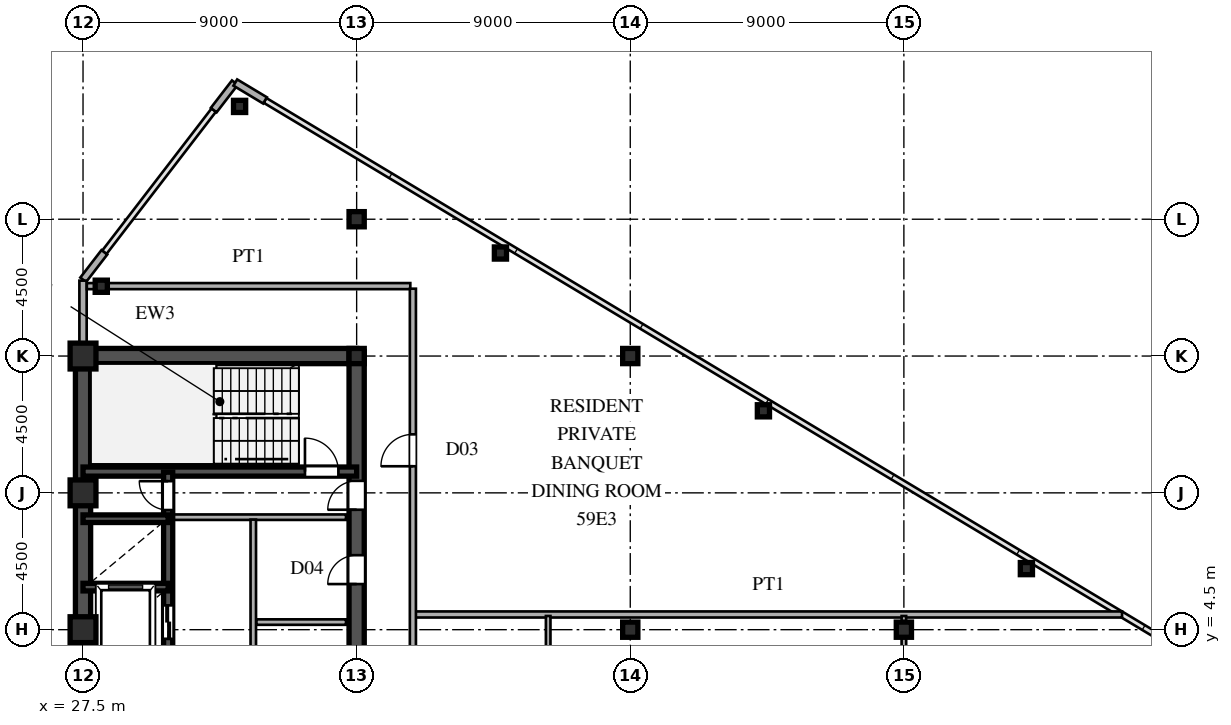
"""IFC4 building model, lengths in metres.
Left out: names, types, materials, properties, quantities, classifications, styles, units other than length and angle.
Written with IfcOpenShell. Run it as: python <this file> out.ifc"""

import sys

from ifc_helpers import new_model, si_unit, direction, frame, frame_2d, origin, origin_2d, place, context, subcontext, project, spatial, rectangle, hollow_rectangle, i_section, extrude, source, transform, mapped, element, fill, save


model = new_model("IFC4")
c1 = context("Model", 3, precision=1e-05, world=origin(), true_north=direction((0.0, 1.0)))
c2 = subcontext(c1, "Body", "Model", "MODEL_VIEW")
j1 = project(units=[si_unit("LENGTHUNIT", "METRE"), si_unit("PLANEANGLEUNIT", "RADIAN")], contexts=[c1])
p1 = place(None, origin())
s1 = spatial("IfcSite", under=j1, at=p1, CompositionType="ELEMENT")
p2 = place(p1, origin())
s2 = spatial("IfcBuilding", under=s1, at=p2, CompositionType="ELEMENT")
p3 = place(p2, frame((0.0, 0.0, 221.1)))
s3 = spatial("IfcBuildingStorey", under=s2, at=p3, CompositionType="ELEMENT", Elevation=221.1)
m1 = source(origin(), c2, "Body", "SweptSolid", [
    extrude(hollow_rectangle(XDim=0.85, YDim=0.85, WallThickness=0.036, at=origin_2d()), origin(), (0.0, 0.0, 1.0), 3.6),
])
for number, where, z_axis, x_axis in (
    (1, (27.5, 4.5, 0.0), (0.0, 0.0, 1.0), (1.0, 0.0, 0.0)),
    (2, (27.5, 9.0, 0.0), (0.0, 0.0, 1.0), (1.0, 0.0, 0.0)),
    (3, (27.5, 13.5, 0.0), (0.0, 0.0, 1.0), (1.0, 0.0, 0.0)),
):
    element("IfcColumn", number, at=place(p3, frame(where, z_axis=z_axis, x_axis=x_axis)), inside=s3, PredefinedType="COLUMN", context=c2, shape_type="MappedRepresentation", body=[
        mapped(m1, transform((0.0, 0.0, 0.0), scale=1.0)),
    ])
m2 = source(origin(), c2, "Body", "SweptSolid", [
    extrude(i_section(OverallWidth=0.5, OverallDepth=0.5, WebThickness=0.02, FlangeThickness=0.032, at=origin_2d()), origin(), (0.0, 0.0, 1.0), 3.6),
])
for number, where, z_axis, x_axis in (
    (4, (36.5, 13.5, 0.0), (0.0, 0.0, 1.0), (1.0, 0.0, 0.0)),
    (5, (36.5, 18.0, 0.0), (0.0, 0.0, 1.0), (1.0, 0.0, 0.0)),
    (6, (45.5, 4.5, 0.0), (0.0, 0.0, 1.0), (1.0, 0.0, 0.0)),
    (7, (45.5, 13.5, 0.0), (0.0, 0.0, 1.0), (1.0, 0.0, 0.0)),
    (8, (54.5, 4.5, 0.0), (0.0, 0.0, 1.0), (1.0, 0.0, 0.0)),
):
    element("IfcColumn", number, at=place(p3, frame(where, z_axis=z_axis, x_axis=x_axis)), inside=s3, PredefinedType="COLUMN", context=c2, shape_type="MappedRepresentation", body=[
        mapped(m2, transform((0.0, 0.0, 0.0), scale=1.0)),
    ])
m3 = source(origin(), c2, "Body", "SweptSolid", [
    extrude(hollow_rectangle(XDim=0.4, YDim=0.4, WallThickness=0.016, at=origin_2d()), origin(), (0.0, 0.0, 1.0), 3.6),
])
for number, where, z_axis, x_axis in (
    (9, (32.65, 21.71, 0.0), (0.0, 0.0, 1.0), (1.0, 0.0, 0.0)),
    (10, (28.1, 15.796, 0.0), (0.0, 0.0, 1.0), (1.0, 0.0, 0.0)),
    (11, (41.23, 16.889, 0.0), (0.0, 0.0, 1.0), (1.0, 0.0, 0.0)),
    (12, (49.88, 11.699, 0.0), (0.0, 0.0, 1.0), (1.0, 0.0, 0.0)),
    (13, (58.53, 6.509, 0.0), (0.0, 0.0, 1.0), (1.0, 0.0, 0.0)),
):
    element("IfcColumn", number, at=place(p3, frame(where, z_axis=z_axis, x_axis=x_axis)), inside=s3, PredefinedType="COLUMN", context=c2, shape_type="MappedRepresentation", body=[
        mapped(m3, transform((0.0, 0.0, 0.0), scale=1.0)),
    ])
for number, where, z_axis, x_axis in (
    (14, (33.486, 21.908, 0.0), (0.0, 0.0, 1.0), (-0.857, 0.515, 0.0)),
    (15, (32.494, 22.492, 0.0), (0.0, 0.0, 1.0), (-0.61, -0.793, 0.0)),
    (16, (28.201, 16.912, 0.0), (0.0, 0.0, 1.0), (-0.61, -0.793, 0.0)),
):
    element("IfcWall", number, at=place(p3, frame(where, z_axis=z_axis, x_axis=x_axis)), inside=s3, PredefinedType="SOLIDWALL", context=c2, shape_type="SweptSolid", body=[
        extrude(rectangle(XDim=1.14, YDim=0.24, at=frame_2d((0.57, 0.0))), origin(), (0.0, 0.0, 1.0), 3.34),
    ])
p4 = place(p3, frame((27.5, 13.755, 0.0), z_axis=(0.0, 0.0, 1.0), x_axis=(0.0, 1.0, 0.0)))
e17 = element("IfcWall", 17, at=p4, inside=s3, PredefinedType="SOLIDWALL", context=c2, shape_type="SweptSolid", body=[
    extrude(rectangle(XDim=0.62, YDim=0.24, at=frame_2d((0.31, 0.0))), origin(), (0.0, 0.0, 1.0), 2.84),
])
p5 = place(p3, frame((27.5, 14.375, 0.0), z_axis=(0.0, 0.0, 1.0), x_axis=(0.0, 1.0, 0.0)))
e18 = element("IfcWall", 18, at=p5, inside=s3, PredefinedType="SOLIDWALL", context=c2, shape_type="SweptSolid", body=[
    extrude(rectangle(XDim=1.605, YDim=0.24, at=frame_2d((0.803, 0.0))), origin(), (0.0, 0.0, 1.0), 3.34),
])
p6 = place(p3, frame((27.5, 1.3, 0.0), z_axis=(0.0, 0.0, 1.0), x_axis=(0.0, 1.0, 0.0)))
e19 = element("IfcWall", 19, at=p6, inside=s3, PredefinedType="SHEAR", context=c2, shape_type="SweptSolid", body=[
    extrude(rectangle(XDim=12.2, YDim=0.5, at=frame_2d((6.1, 0.0))), origin(), (0.0, 0.0, 1.0), 3.34),
])
p7 = place(p3, frame((27.5, 13.5, 0.0), z_axis=(0.0, 0.0, 1.0), x_axis=(1.0, 0.0, 0.0)))
e20 = element("IfcWall", 20, at=p7, inside=s3, PredefinedType="SHEAR", context=c2, shape_type="SweptSolid", body=[
    extrude(rectangle(XDim=9.0, YDim=0.5, at=frame_2d((4.5, 0.0))), origin(), (0.0, 0.0, 1.0), 3.34),
])
p8 = place(p3, frame((36.5, 8.2, 0.0), z_axis=(0.0, 0.0, 1.0), x_axis=(0.0, 1.0, 0.0)))
e21 = element("IfcWall", 21, at=p8, inside=s3, PredefinedType="SHEAR", context=c2, shape_type="SweptSolid", body=[
    extrude(rectangle(XDim=5.45, YDim=0.5, at=frame_2d((2.725, 0.0))), origin(), (0.0, 0.0, 1.0), 3.34),
])
p9 = place(p8, frame((0.245, 0.0, 0.0)))
e22 = element("IfcOpeningElement", 22, at=p9, cuts=e21, PredefinedType="OPENING", context=c2, shape_type="SweptSolid", body=[
    extrude(rectangle(XDim=0.95, YDim=2.15, at=frame_2d((0.475, 1.075))), frame((0.0, 0.26, 0.0), z_axis=(0.0, -1.0, 0.0), x_axis=(1.0, 0.0, 0.0)), (0.0, 0.0, 1.0), 0.52),
])
p10 = place(p3, frame((36.5, 1.3, 0.0), z_axis=(0.0, 0.0, 1.0), x_axis=(0.0, 1.0, 0.0)))
e23 = element("IfcWall", 23, at=p10, inside=s3, PredefinedType="SHEAR", context=c2, shape_type="SweptSolid", body=[
    extrude(rectangle(XDim=3.45, YDim=0.5, at=frame_2d((1.725, 0.0))), origin(), (0.0, 0.0, 1.0), 3.34),
])
p11 = place(p10, frame((1.25, 0.0, 0.0)))
e24 = element("IfcOpeningElement", 24, at=p11, cuts=e23, PredefinedType="OPENING", context=c2, shape_type="SweptSolid", body=[
    extrude(rectangle(XDim=0.95, YDim=2.15, at=frame_2d((0.475, 1.075))), frame((0.0, 0.26, 0.0), z_axis=(0.0, -1.0, 0.0), x_axis=(1.0, 0.0, 0.0)), (0.0, 0.0, 1.0), 0.52),
])
p12 = place(p3, frame((36.5, 4.75, 0.0), z_axis=(0.0, 0.0, 1.0), x_axis=(0.0, 1.0, 0.0)))
e25 = element("IfcWall", 25, at=p12, inside=s3, PredefinedType="SHEAR", context=c2, shape_type="SweptSolid", body=[
    extrude(rectangle(XDim=3.45, YDim=0.5, at=frame_2d((1.725, 0.0))), origin(), (0.0, 0.0, 1.0), 3.34),
])
p13 = place(p12, frame((1.25, 0.0, 0.0)))
e26 = element("IfcOpeningElement", 26, at=p13, cuts=e25, PredefinedType="OPENING", context=c2, shape_type="SweptSolid", body=[
    extrude(rectangle(XDim=0.95, YDim=2.15, at=frame_2d((0.475, 1.075))), frame((0.0, 0.26, 0.0), z_axis=(0.0, -1.0, 0.0), x_axis=(1.0, 0.0, 0.0)), (0.0, 0.0, 1.0), 0.52),
])
p14 = place(p3, frame((27.5, 9.7, 0.0), z_axis=(0.0, 0.0, 1.0), x_axis=(1.0, 0.0, 0.0)))
e27 = element("IfcWall", 27, at=p14, inside=s3, PredefinedType="SHEAR", context=c2, shape_type="SweptSolid", body=[
    extrude(rectangle(XDim=9.0, YDim=0.3, at=frame_2d((4.5, 0.0))), origin(), (0.0, 0.0, 1.0), 3.34),
])
p15 = place(p14, frame((7.3, 0.0, 0.0)))
e28 = element("IfcOpeningElement", 28, at=p15, cuts=e27, PredefinedType="OPENING", context=c2, shape_type="SweptSolid", body=[
    extrude(rectangle(XDim=1.1, YDim=2.2, at=frame_2d((0.55, 1.1))), frame((0.0, 0.16, 0.0), z_axis=(0.0, -1.0, 0.0), x_axis=(1.0, 0.0, 0.0)), (0.0, 0.0, 1.0), 0.32),
])
for number, where, z_axis, x_axis in (
    (29, (27.5, 5.9, 0.0), (0.0, 0.0, 1.0), (1.0, 0.0, 0.0)),
    (30, (27.5, 8.15, 0.0), (0.0, 0.0, 1.0), (1.0, 0.0, 0.0)),
):
    element("IfcWall", number, at=place(p3, frame(where, z_axis=z_axis, x_axis=x_axis)), inside=s3, PredefinedType="SHEAR", context=c2, shape_type="SweptSolid", body=[
        extrude(rectangle(XDim=2.8, YDim=0.25, at=frame_2d((1.4, 0.0))), origin(), (0.0, 0.0, 1.0), 3.34),
    ])
p16 = place(p3, frame((30.3, 3.6, 0.0), z_axis=(0.0, 0.0, 1.0), x_axis=(0.0, 1.0, 0.0)))
e31 = element("IfcWall", 31, at=p16, inside=s3, PredefinedType="SHEAR", context=c2, shape_type="SweptSolid", body=[
    extrude(rectangle(XDim=2.3, YDim=0.3, at=frame_2d((1.15, 0.0))), origin(), (0.0, 0.0, 1.0), 3.34),
])
p17 = place(p16, frame((0.6, 0.0, 0.0)))
e32 = element("IfcOpeningElement", 32, at=p17, cuts=e31, PredefinedType="OPENING", context=c2, shape_type="SweptSolid", body=[
    extrude(rectangle(XDim=1.1, YDim=2.2, at=frame_2d((0.55, 1.1))), frame((0.0, 0.16, 0.0), z_axis=(0.0, -1.0, 0.0), x_axis=(1.0, 0.0, 0.0)), (0.0, 0.0, 1.0), 0.32),
])
p18 = place(p3, frame((30.3, 5.9, 0.0), z_axis=(0.0, 0.0, 1.0), x_axis=(0.0, 1.0, 0.0)))
e33 = element("IfcWall", 33, at=p18, inside=s3, PredefinedType="SHEAR", context=c2, shape_type="SweptSolid", body=[
    extrude(rectangle(XDim=2.25, YDim=0.3, at=frame_2d((1.125, 0.0))), origin(), (0.0, 0.0, 1.0), 3.34),
])
p19 = place(p3, frame((30.3, 8.15, 0.0), z_axis=(0.0, 0.0, 1.0), x_axis=(0.0, 1.0, 0.0)))
e34 = element("IfcWall", 34, at=p19, inside=s3, PredefinedType="SHEAR", context=c2, shape_type="SweptSolid", body=[
    extrude(rectangle(XDim=1.53, YDim=0.3, at=frame_2d((0.765, 0.0))), origin(), (0.0, 0.0, 1.0), 3.34),
])
p20 = place(p19, frame((0.285, 0.0, 0.0)))
e35 = element("IfcOpeningElement", 35, at=p20, cuts=e34, PredefinedType="OPENING", context=c2, shape_type="SweptSolid", body=[
    extrude(rectangle(XDim=0.95, YDim=2.15, at=frame_2d((0.475, 1.075))), frame((0.0, 0.16, 0.0), z_axis=(0.0, -1.0, 0.0), x_axis=(1.0, 0.0, 0.0)), (0.0, 0.0, 1.0), 0.32),
])
p21 = place(p3, frame((30.45, 8.2, 0.0), z_axis=(0.0, 0.0, 1.0), x_axis=(1.0, 0.0, 0.0)))
e36 = element("IfcWall", 36, at=p21, inside=s3, PredefinedType="PARTITIONING", context=c2, shape_type="SweptSolid", body=[
    extrude(rectangle(XDim=5.7, YDim=0.18, at=frame_2d((2.85, 0.0))), origin(), (0.0, 0.0, 1.0), 3.34),
])
p22 = place(p3, frame((33.1, 1.38, 0.0), z_axis=(0.0, 0.0, 1.0), x_axis=(0.0, 1.0, 0.0)))
e37 = element("IfcWall", 37, at=p22, inside=s3, PredefinedType="PARTITIONING", context=c2, shape_type="SweptSolid", body=[
    extrude(rectangle(XDim=6.74, YDim=0.18, at=frame_2d((3.37, 0.0))), origin(), (0.0, 0.0, 1.0), 3.34),
])
p23 = place(p3, frame((33.2, 4.75, 0.0), z_axis=(0.0, 0.0, 1.0), x_axis=(1.0, 0.0, 0.0)))
e38 = element("IfcWall", 38, at=p23, inside=s3, PredefinedType="PARTITIONING", context=c2, shape_type="SweptSolid", body=[
    extrude(rectangle(XDim=2.95, YDim=0.18, at=frame_2d((1.475, 0.0))), origin(), (0.0, 0.0, 1.0), 3.34),
])
p24 = place(p3, frame((38.43, 5.0, 0.0), z_axis=(0.0, 0.0, 1.0), x_axis=(1.0, 0.0, 0.0)))
e39 = element("IfcWall", 39, at=p24, inside=s3, PredefinedType="PARTITIONING", context=c2, shape_type="SweptSolid", body=[
    extrude(rectangle(XDim=23.246, YDim=0.2, at=frame_2d((11.623, 0.0))), origin(), (0.0, 0.0, 1.0), 3.34),
])
p25 = place(p3, frame((27.625, 15.8, 0.0), z_axis=(0.0, 0.0, 1.0), x_axis=(1.0, 0.0, 0.0)))
e40 = element("IfcWall", 40, at=p25, inside=s3, PredefinedType="PARTITIONING", context=c2, shape_type="SweptSolid", body=[
    extrude(rectangle(XDim=10.64, YDim=0.2, at=frame_2d((5.32, 0.0))), origin(), (0.0, 0.0, 1.0), 3.34),
])
p26 = place(p3, frame((38.35, -15.715, 0.0), z_axis=(0.0, 0.0, 1.0), x_axis=(0.0, 1.0, 0.0)))
e41 = element("IfcWall", 41, at=p26, inside=s3, PredefinedType="PARTITIONING", context=c2, shape_type="SweptSolid", body=[
    extrude(rectangle(XDim=31.43, YDim=0.2, at=frame_2d((15.715, 0.0))), origin(), (0.0, 0.0, 1.0), 3.34),
])
p27 = place(p26, frame((3.09, 0.0, 0.0)))
e42 = element("IfcOpeningElement", 42, at=p27, cuts=e41, PredefinedType="OPENING", context=c2, shape_type="SweptSolid", body=[
    extrude(rectangle(XDim=1.05, YDim=2.25, at=frame_2d((0.525, 1.125))), frame((0.0, 0.11, 0.0), z_axis=(0.0, -1.0, 0.0), x_axis=(1.0, 0.0, 0.0)), (0.0, 0.0, 1.0), 0.22),
])
p28 = place(p26, frame((13.289, 0.0, 0.0)))
e43 = element("IfcOpeningElement", 43, at=p28, cuts=e41, PredefinedType="OPENING", context=c2, shape_type="SweptSolid", body=[
    extrude(rectangle(XDim=1.05, YDim=2.25, at=frame_2d((0.525, 1.125))), frame((0.0, 0.11, 0.0), z_axis=(0.0, -1.0, 0.0), x_axis=(1.0, 0.0, 0.0)), (0.0, 0.0, 1.0), 0.22),
])
p29 = place(p26, frame((25.59, 0.0, 0.0)))
e44 = element("IfcOpeningElement", 44, at=p29, cuts=e41, PredefinedType="OPENING", context=c2, shape_type="SweptSolid", body=[
    extrude(rectangle(XDim=1.05, YDim=2.25, at=frame_2d((0.525, 1.125))), frame((0.0, 0.11, 0.0), z_axis=(0.0, -1.0, 0.0), x_axis=(1.0, 0.0, 0.0)), (0.0, 0.0, 1.0), 0.22),
])
p30 = place(p3, frame((42.8, 1.032, 0.0), z_axis=(0.0, 0.0, 1.0), x_axis=(0.0, 1.0, 0.0)))
e45 = element("IfcWall", 45, at=p30, inside=s3, PredefinedType="PARTITIONING", context=c2, shape_type="SweptSolid", body=[
    extrude(rectangle(XDim=3.918, YDim=0.15, at=frame_2d((1.959, 0.0))), origin(), (0.0, 0.0, 1.0), 3.34),
])
p31 = place(p3, frame((54.5, -4.52, 0.0), z_axis=(0.0, 0.0, 1.0), x_axis=(0.0, 1.0, 0.0)))
e46 = element("IfcWall", 46, at=p31, inside=s3, PredefinedType="PARTITIONING", context=c2, shape_type="SweptSolid", body=[
    extrude(rectangle(XDim=9.47, YDim=0.15, at=frame_2d((4.735, 0.0))), origin(), (0.0, 0.0, 1.0), 2.44),
])
p32 = place(p31, frame((2.345, 0.0, 0.0)))
e47 = element("IfcOpeningElement", 47, at=p32, cuts=e46, PredefinedType="OPENING", context=c2, shape_type="SweptSolid", body=[
    extrude(rectangle(XDim=0.95, YDim=2.15, at=frame_2d((0.475, 1.075))), frame((0.0, 0.085, 0.0), z_axis=(0.0, -1.0, 0.0), x_axis=(1.0, 0.0, 0.0)), (0.0, 0.0, 1.0), 0.17),
])
m4 = source(origin(), c2, "Body", "SweptSolid", [
    extrude(rectangle(XDim=0.95, YDim=2.15, at=frame_2d((0.475, 1.075))), frame((0.0, 0.025, 0.0), z_axis=(0.0, -1.0, 0.0), x_axis=(1.0, 0.0, 0.0)), (0.0, 0.0, 1.0), 0.05),
])
p33 = place(p9, origin())
e48 = element("IfcDoor", 48, at=p33, inside=s3, OperationType="SINGLE_SWING_LEFT", PredefinedType="DOOR", context=c2, shape_type="MappedRepresentation", body=[
    mapped(m4, transform((0.0, 0.0, 0.0), scale=1.0)),
])
fill(e22, e48)
p34 = place(p13, origin())
e49 = element("IfcDoor", 49, at=p34, inside=s3, OperationType="SINGLE_SWING_LEFT", PredefinedType="DOOR", context=c2, shape_type="MappedRepresentation", body=[
    mapped(m4, transform((0.0, 0.0, 0.0), scale=1.0)),
])
fill(e26, e49)
m5 = source(origin(), c2, "Body", "SweptSolid", [
    extrude(rectangle(XDim=1.1, YDim=2.2, at=frame_2d((0.55, 1.1))), frame((0.0, 0.025, 0.0), z_axis=(0.0, -1.0, 0.0), x_axis=(1.0, 0.0, 0.0)), (0.0, 0.0, 1.0), 0.05),
])
p35 = place(p15, origin())
e50 = element("IfcDoor", 50, at=p35, inside=s3, OperationType="SINGLE_SWING_LEFT", PredefinedType="DOOR", context=c2, shape_type="MappedRepresentation", body=[
    mapped(m5, transform((0.0, 0.0, 0.0), scale=1.0)),
])
fill(e28, e50)
m6 = source(origin(), c2, "Body", "SweptSolid", [
    extrude(rectangle(XDim=1.1, YDim=2.2, at=frame_2d((0.55, 1.1))), frame((0.0, 0.025, 0.0), z_axis=(0.0, -1.0, 0.0), x_axis=(1.0, 0.0, 0.0)), (0.0, 0.0, 1.0), 0.05),
])
p36 = place(p17, origin())
e51 = element("IfcDoor", 51, at=p36, inside=s3, OperationType="DOUBLE_DOOR_SLIDING", PredefinedType="DOOR", context=c2, shape_type="MappedRepresentation", body=[
    mapped(m6, transform((0.0, 0.0, 0.0), scale=1.0)),
])
fill(e32, e51)
p37 = place(p20, origin())
e52 = element("IfcDoor", 52, at=p37, inside=s3, OperationType="SINGLE_SWING_RIGHT", PredefinedType="DOOR", context=c2, shape_type="MappedRepresentation", body=[
    mapped(m4, transform((0.0, 0.0, 0.0), scale=1.0)),
])
fill(e35, e52)
m7 = source(origin(), c2, "Body", "SweptSolid", [
    extrude(rectangle(XDim=1.05, YDim=2.25, at=frame_2d((0.525, 1.125))), frame((0.0, 0.025, 0.0), z_axis=(0.0, -1.0, 0.0), x_axis=(1.0, 0.0, 0.0)), (0.0, 0.0, 1.0), 0.05),
])
p38 = place(p29, origin())
e53 = element("IfcDoor", 53, at=p38, inside=s3, OperationType="SINGLE_SWING_LEFT", PredefinedType="DOOR", context=c2, shape_type="MappedRepresentation", body=[
    mapped(m7, transform((0.0, 0.0, 0.0), scale=1.0)),
])
fill(e44, e53)
save(model, sys.argv[1])
